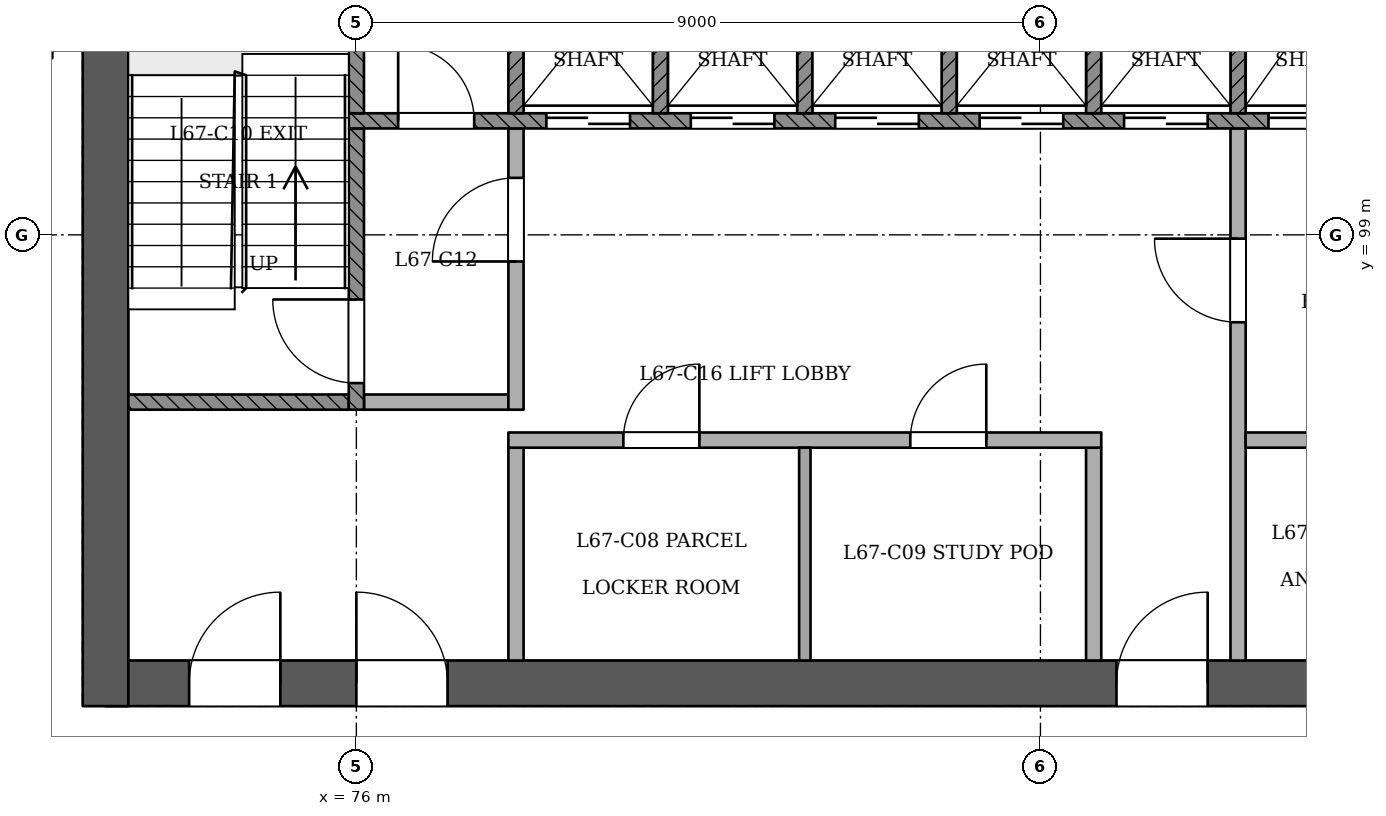
"""IFC4 building model, lengths in metres.
Left out: names, types, materials, properties, quantities, classifications, styles, units other than length and angle.
Written with IfcOpenShell. Run it as: python <this file> out.ifc"""

import sys

from ifc_helpers import new_model, si_unit, direction, frame, frame_2d, origin, place, context, subcontext, project, spatial, rectangle, extrude, element, fill, save


model = new_model("IFC4")
c1 = context("Model", 3, precision=1e-05, world=origin(), true_north=direction((0.0, 1.0)))
c2 = subcontext(c1, "Body", "Model", "MODEL_VIEW")
j1 = project(units=[si_unit("LENGTHUNIT", "METRE"), si_unit("PLANEANGLEUNIT", "RADIAN")], contexts=[c1])
p1 = place(None, origin())
s1 = spatial("IfcSite", under=j1, at=p1, CompositionType="ELEMENT")
p2 = place(p1, origin())
s2 = spatial("IfcBuilding", under=s1, at=p2, CompositionType="ELEMENT")
p3 = place(p2, frame((0.0, 0.0, 260.8)))
s3 = spatial("IfcBuildingStorey", under=s2, at=p3, CompositionType="ELEMENT", Elevation=260.8)
p4 = place(p3, frame((72.7, 93.1, 0.0), z_axis=(0.0, 0.0, 1.0), x_axis=(1.0, 0.0, 0.0)))
e1 = element("IfcWall", 1, at=p4, inside=s3, PredefinedType="SHEAR", context=c2, shape_type="SweptSolid", body=[
    extrude(rectangle(XDim=24.9, YDim=0.6, at=frame_2d((12.45, 0.0))), origin(), (0.0, 0.0, 1.0), 3.6),
])
p5 = place(p4, frame((1.1, 0.0, 0.0)))
e2 = element("IfcOpeningElement", 2, at=p5, cuts=e1, PredefinedType="OPENING", context=c2, shape_type="SweptSolid", body=[
    extrude(rectangle(XDim=1.2, YDim=2.1, at=frame_2d((0.6, 1.05))), frame((0.0, 0.311, 0.0), z_axis=(0.0, -1.0, 0.0), x_axis=(1.0, 0.0, 0.0)), (0.0, 0.0, 1.0), 0.621),
])
p6 = place(p4, frame((3.3, 0.0, 0.0)))
e3 = element("IfcOpeningElement", 3, at=p6, cuts=e1, PredefinedType="OPENING", context=c2, shape_type="SweptSolid", body=[
    extrude(rectangle(XDim=1.2, YDim=2.1, at=frame_2d((0.6, 1.05))), frame((0.0, 0.311, 0.0), z_axis=(0.0, -1.0, 0.0), x_axis=(1.0, 0.0, 0.0)), (0.0, 0.0, 1.0), 0.621),
])
p7 = place(p4, frame((13.3, 0.0, 0.0)))
e4 = element("IfcOpeningElement", 4, at=p7, cuts=e1, PredefinedType="OPENING", context=c2, shape_type="SweptSolid", body=[
    extrude(rectangle(XDim=1.2, YDim=2.1, at=frame_2d((0.6, 1.05))), frame((0.0, 0.311, 0.0), z_axis=(0.0, -1.0, 0.0), x_axis=(1.0, 0.0, 0.0)), (0.0, 0.0, 1.0), 0.621),
])
p8 = place(p4, frame((15.962, 0.0, 0.0)))
e5 = element("IfcOpeningElement", 5, at=p8, cuts=e1, PredefinedType="OPENING", context=c2, shape_type="SweptSolid", body=[
    extrude(rectangle(XDim=1.0, YDim=2.1, at=frame_2d((0.5, 1.05))), frame((0.0, 0.311, 0.0), z_axis=(0.0, -1.0, 0.0), x_axis=(1.0, 0.0, 0.0)), (0.0, 0.0, 1.0), 0.621),
])
p9 = place(p4, frame((18.75, 0.0, 0.0)))
e6 = element("IfcOpeningElement", 6, at=p9, cuts=e1, PredefinedType="OPENING", context=c2, shape_type="SweptSolid", body=[
    extrude(rectangle(XDim=1.0, YDim=2.1, at=frame_2d((0.5, 1.05))), frame((0.0, 0.311, 0.0), z_axis=(0.0, -1.0, 0.0), x_axis=(1.0, 0.0, 0.0)), (0.0, 0.0, 1.0), 0.621),
])
p10 = place(p4, frame((21.938, 0.0, 0.0)))
e7 = element("IfcOpeningElement", 7, at=p10, cuts=e1, PredefinedType="OPENING", context=c2, shape_type="SweptSolid", body=[
    extrude(rectangle(XDim=1.0, YDim=2.1, at=frame_2d((0.5, 1.05))), frame((0.0, 0.311, 0.0), z_axis=(0.0, -1.0, 0.0), x_axis=(1.0, 0.0, 0.0)), (0.0, 0.0, 1.0), 0.621),
])
p11 = place(p3, frame((72.7, 103.7, 0.0), z_axis=(0.0, 0.0, 1.0), x_axis=(0.0, -1.0, 0.0)))
e8 = element("IfcWall", 8, at=p11, inside=s3, PredefinedType="SHEAR", context=c2, shape_type="SweptSolid", body=[
    extrude(rectangle(XDim=10.9, YDim=0.6, at=frame_2d((5.45, 0.0))), origin(), (0.0, 0.0, 1.0), 3.6),
])
p12 = place(p3, frame((72.0, 101.4, 0.0), z_axis=(0.0, 0.0, 1.0), x_axis=(-1.0, 0.0, 0.0)))
e9 = element("IfcWall", 9, at=p12, inside=s3, PredefinedType="PARTITIONING", context=c2, shape_type="SweptSolid", body=[
    extrude(rectangle(XDim=1.8, YDim=0.15, at=frame_2d((0.9, 0.0))), origin(), (0.0, 0.0, 1.0), 3.2),
])
p13 = place(p12, frame((0.55, 0.0, 0.0)))
e10 = element("IfcOpeningElement", 10, at=p13, cuts=e9, PredefinedType="OPENING", context=c2, shape_type="SweptSolid", body=[
    extrude(rectangle(XDim=1.0, YDim=2.1, at=frame_2d((0.5, 1.05))), frame((0.0, 0.085, 0.0), z_axis=(0.0, -1.0, 0.0), x_axis=(1.0, 0.0, 0.0)), (0.0, 0.0, 1.0), 0.171),
])
p14 = place(p3, frame((78.1, 93.4, 0.0), z_axis=(0.0, 0.0, 1.0), x_axis=(0.0, 1.0, 0.0)))
e11 = element("IfcWall", 11, at=p14, inside=s3, PredefinedType="PARTITIONING", context=c2, shape_type="SweptSolid", body=[
    extrude(rectangle(XDim=2.8, YDim=0.2, at=frame_2d((1.4, 0.0))), origin(), (0.0, 0.0, 1.0), 3.2),
])
p15 = place(p3, frame((81.9, 93.4, 0.0), z_axis=(0.0, 0.0, 1.0), x_axis=(0.0, 1.0, 0.0)))
e12 = element("IfcWall", 12, at=p15, inside=s3, PredefinedType="PARTITIONING", context=c2, shape_type="SweptSolid", body=[
    extrude(rectangle(XDim=2.8, YDim=0.15, at=frame_2d((1.4, 0.0))), origin(), (0.0, 0.0, 1.0), 3.2),
])
p16 = place(p3, frame((85.7, 93.4, 0.0), z_axis=(0.0, 0.0, 1.0), x_axis=(0.0, 1.0, 0.0)))
e13 = element("IfcWall", 13, at=p16, inside=s3, PredefinedType="PARTITIONING", context=c2, shape_type="SweptSolid", body=[
    extrude(rectangle(XDim=2.8, YDim=0.2, at=frame_2d((1.4, 0.0))), origin(), (0.0, 0.0, 1.0), 3.2),
])
p17 = place(p3, frame((87.6, 93.4, 0.0), z_axis=(0.0, 0.0, 1.0), x_axis=(0.0, 1.0, 0.0)))
e14 = element("IfcWall", 14, at=p17, inside=s3, PredefinedType="PARTITIONING", context=c2, shape_type="SweptSolid", body=[
    extrude(rectangle(XDim=7.0, YDim=0.2, at=frame_2d((3.5, 0.0))), origin(), (0.0, 0.0, 1.0), 3.2),
])
p18 = place(p17, frame((4.45, 0.0, 0.0)))
e15 = element("IfcOpeningElement", 15, at=p18, cuts=e14, PredefinedType="OPENING", context=c2, shape_type="SweptSolid", body=[
    extrude(rectangle(XDim=1.1, YDim=2.1, at=frame_2d((0.55, 1.05))), frame((0.0, 0.11, 0.0), z_axis=(0.0, -1.0, 0.0), x_axis=(1.0, 0.0, 0.0)), (0.0, 0.0, 1.0), 0.221),
])
p19 = place(p3, frame((78.0, 96.3, 0.0), z_axis=(0.0, 0.0, 1.0), x_axis=(1.0, 0.0, 0.0)))
e16 = element("IfcWall", 16, at=p19, inside=s3, PredefinedType="PARTITIONING", context=c2, shape_type="SweptSolid", body=[
    extrude(rectangle(XDim=7.8, YDim=0.2, at=frame_2d((3.9, 0.0))), origin(), (0.0, 0.0, 1.0), 3.2),
])
p20 = place(p19, frame((1.512, 0.0, 0.0)))
e17 = element("IfcOpeningElement", 17, at=p20, cuts=e16, PredefinedType="OPENING", context=c2, shape_type="SweptSolid", body=[
    extrude(rectangle(XDim=1.0, YDim=2.1, at=frame_2d((0.5, 1.05))), frame((0.0, 0.11, 0.0), z_axis=(0.0, -1.0, 0.0), x_axis=(1.0, 0.0, 0.0)), (0.0, 0.0, 1.0), 0.221),
])
p21 = place(p19, frame((5.288, 0.0, 0.0)))
e18 = element("IfcOpeningElement", 18, at=p21, cuts=e16, PredefinedType="OPENING", context=c2, shape_type="SweptSolid", body=[
    extrude(rectangle(XDim=1.0, YDim=2.1, at=frame_2d((0.5, 1.05))), frame((0.0, 0.11, 0.0), z_axis=(0.0, -1.0, 0.0), x_axis=(1.0, 0.0, 0.0)), (0.0, 0.0, 1.0), 0.221),
])
p22 = place(p3, frame((87.7, 96.3, 0.0), z_axis=(0.0, 0.0, 1.0), x_axis=(1.0, 0.0, 0.0)))
e19 = element("IfcWall", 19, at=p22, inside=s3, PredefinedType="PARTITIONING", context=c2, shape_type="SweptSolid", body=[
    extrude(rectangle(XDim=3.6, YDim=0.2, at=frame_2d((1.8, 0.0))), origin(), (0.0, 0.0, 1.0), 3.2),
])
p23 = place(p3, frame((73.0, 96.8, 0.0), z_axis=(0.0, 0.0, 1.0), x_axis=(1.0, 0.0, 0.0)))
e20 = element("IfcWall", 20, at=p23, inside=s3, PredefinedType="SOLIDWALL", context=c2, shape_type="SweptSolid", body=[
    extrude(rectangle(XDim=2.9, YDim=0.2, at=frame_2d((1.45, 0.0))), origin(), (0.0, 0.0, 1.0), 3.2),
])
p24 = place(p3, frame((76.0, 96.7, 0.0), z_axis=(0.0, 0.0, 1.0), x_axis=(0.0, 1.0, 0.0)))
e21 = element("IfcWall", 21, at=p24, inside=s3, PredefinedType="SOLIDWALL", context=c2, shape_type="SweptSolid", body=[
    extrude(rectangle(XDim=3.7, YDim=0.2, at=frame_2d((1.85, 0.0))), origin(), (0.0, 0.0, 1.0), 3.2),
])
p25 = place(p24, frame((0.35, 0.0, 0.0)))
e22 = element("IfcOpeningElement", 22, at=p25, cuts=e21, PredefinedType="OPENING", context=c2, shape_type="SweptSolid", body=[
    extrude(rectangle(XDim=1.1, YDim=2.1, at=frame_2d((0.55, 1.05))), frame((0.0, 0.11, 0.0), z_axis=(0.0, -1.0, 0.0), x_axis=(1.0, 0.0, 0.0)), (0.0, 0.0, 1.0), 0.221),
])
p26 = place(p3, frame((76.1, 96.8, 0.0), z_axis=(0.0, 0.0, 1.0), x_axis=(1.0, 0.0, 0.0)))
e23 = element("IfcWall", 23, at=p26, inside=s3, PredefinedType="PARTITIONING", context=c2, shape_type="SweptSolid", body=[
    extrude(rectangle(XDim=1.9, YDim=0.2, at=frame_2d((0.95, 0.0))), origin(), (0.0, 0.0, 1.0), 3.2),
])
p27 = place(p3, frame((78.1, 96.7, 0.0), z_axis=(0.0, 0.0, 1.0), x_axis=(0.0, 1.0, 0.0)))
e24 = element("IfcWall", 24, at=p27, inside=s3, PredefinedType="PARTITIONING", context=c2, shape_type="SweptSolid", body=[
    extrude(rectangle(XDim=3.7, YDim=0.2, at=frame_2d((1.85, 0.0))), origin(), (0.0, 0.0, 1.0), 3.2),
])
p28 = place(p27, frame((1.95, 0.0, 0.0)))
e25 = element("IfcOpeningElement", 25, at=p28, cuts=e24, PredefinedType="OPENING", context=c2, shape_type="SweptSolid", body=[
    extrude(rectangle(XDim=1.1, YDim=2.1, at=frame_2d((0.55, 1.05))), frame((0.0, 0.11, 0.0), z_axis=(0.0, -1.0, 0.0), x_axis=(1.0, 0.0, 0.0)), (0.0, 0.0, 1.0), 0.221),
])
p29 = place(p3, frame((75.9, 100.5, 0.0), z_axis=(0.0, 0.0, 1.0), x_axis=(1.0, 0.0, 0.0)))
e26 = element("IfcWall", 26, at=p29, inside=s3, PredefinedType="SOLIDWALL", context=c2, shape_type="SweptSolid", body=[
    extrude(rectangle(XDim=18.2, YDim=0.2, at=frame_2d((9.1, 0.0))), origin(), (0.0, 0.0, 1.0), 3.2),
])
p30 = place(p29, frame((2.6, 0.0, 0.0)))
e27 = element("IfcOpeningElement", 27, at=p30, cuts=e26, PredefinedType="OPENING", context=c2, shape_type="SweptSolid", body=[
    extrude(rectangle(XDim=1.1, YDim=2.1, at=frame_2d((0.55, 1.05))), frame((0.0, 0.11, 0.0), z_axis=(0.0, -1.0, 0.0), x_axis=(1.0, 0.0, 0.0)), (0.0, 0.0, 1.0), 0.221),
])
p31 = place(p29, frame((4.5, 0.0, 0.0)))
e28 = element("IfcOpeningElement", 28, at=p31, cuts=e26, PredefinedType="OPENING", context=c2, shape_type="SweptSolid", body=[
    extrude(rectangle(XDim=1.1, YDim=2.1, at=frame_2d((0.55, 1.05))), frame((0.0, 0.11, 0.0), z_axis=(0.0, -1.0, 0.0), x_axis=(1.0, 0.0, 0.0)), (0.0, 0.0, 1.0), 0.221),
])
p32 = place(p29, frame((6.4, 0.0, 0.0)))
e29 = element("IfcOpeningElement", 29, at=p32, cuts=e26, PredefinedType="OPENING", context=c2, shape_type="SweptSolid", body=[
    extrude(rectangle(XDim=1.1, YDim=2.1, at=frame_2d((0.55, 1.05))), frame((0.0, 0.11, 0.0), z_axis=(0.0, -1.0, 0.0), x_axis=(1.0, 0.0, 0.0)), (0.0, 0.0, 1.0), 0.221),
])
p33 = place(p29, frame((8.3, 0.0, 0.0)))
e30 = element("IfcOpeningElement", 30, at=p33, cuts=e26, PredefinedType="OPENING", context=c2, shape_type="SweptSolid", body=[
    extrude(rectangle(XDim=1.1, YDim=2.1, at=frame_2d((0.55, 1.05))), frame((0.0, 0.11, 0.0), z_axis=(0.0, -1.0, 0.0), x_axis=(1.0, 0.0, 0.0)), (0.0, 0.0, 1.0), 0.221),
])
p34 = place(p29, frame((10.2, 0.0, 0.0)))
e31 = element("IfcOpeningElement", 31, at=p34, cuts=e26, PredefinedType="OPENING", context=c2, shape_type="SweptSolid", body=[
    extrude(rectangle(XDim=1.1, YDim=2.1, at=frame_2d((0.55, 1.05))), frame((0.0, 0.11, 0.0), z_axis=(0.0, -1.0, 0.0), x_axis=(1.0, 0.0, 0.0)), (0.0, 0.0, 1.0), 0.221),
])
p35 = place(p29, frame((12.1, 0.0, 0.0)))
e32 = element("IfcOpeningElement", 32, at=p35, cuts=e26, PredefinedType="OPENING", context=c2, shape_type="SweptSolid", body=[
    extrude(rectangle(XDim=1.1, YDim=2.1, at=frame_2d((0.55, 1.05))), frame((0.0, 0.11, 0.0), z_axis=(0.0, -1.0, 0.0), x_axis=(1.0, 0.0, 0.0)), (0.0, 0.0, 1.0), 0.221),
])
p36 = place(p29, frame((14.0, 0.0, 0.0)))
e33 = element("IfcOpeningElement", 33, at=p36, cuts=e26, PredefinedType="OPENING", context=c2, shape_type="SweptSolid", body=[
    extrude(rectangle(XDim=1.1, YDim=2.1, at=frame_2d((0.55, 1.05))), frame((0.0, 0.11, 0.0), z_axis=(0.0, -1.0, 0.0), x_axis=(1.0, 0.0, 0.0)), (0.0, 0.0, 1.0), 0.221),
])
p37 = place(p29, frame((0.65, 0.0, 0.0)))
e34 = element("IfcOpeningElement", 34, at=p37, cuts=e26, PredefinedType="OPENING", context=c2, shape_type="SweptSolid", body=[
    extrude(rectangle(XDim=1.0, YDim=2.1, at=frame_2d((0.5, 1.05))), frame((0.0, 0.11, 0.0), z_axis=(0.0, -1.0, 0.0), x_axis=(1.0, 0.0, 0.0)), (0.0, 0.0, 1.0), 0.221),
])
p38 = place(p29, frame((16.3, 0.0, 0.0)))
e35 = element("IfcOpeningElement", 35, at=p38, cuts=e26, PredefinedType="OPENING", context=c2, shape_type="SweptSolid", body=[
    extrude(rectangle(XDim=1.0, YDim=2.1, at=frame_2d((0.5, 1.05))), frame((0.0, 0.11, 0.0), z_axis=(0.0, -1.0, 0.0), x_axis=(1.0, 0.0, 0.0)), (0.0, 0.0, 1.0), 0.221),
])
for number, where, z_axis, x_axis in (
    (36, (76.0, 100.6, 0.0), (0.0, 0.0, 1.0), (0.0, 1.0, 0.0)),
    (37, (78.1, 100.6, 0.0), (0.0, 0.0, 1.0), (0.0, 1.0, 0.0)),
    (38, (80.0, 100.6, 0.0), (0.0, 0.0, 1.0), (0.0, 1.0, 0.0)),
    (39, (81.9, 100.6, 0.0), (0.0, 0.0, 1.0), (0.0, 1.0, 0.0)),
    (40, (83.8, 100.6, 0.0), (0.0, 0.0, 1.0), (0.0, 1.0, 0.0)),
    (41, (85.7, 100.6, 0.0), (0.0, 0.0, 1.0), (0.0, 1.0, 0.0)),
    (42, (87.6, 100.6, 0.0), (0.0, 0.0, 1.0), (0.0, 1.0, 0.0)),
):
    element("IfcWall", number, at=place(p3, frame(where, z_axis=z_axis, x_axis=x_axis)), inside=s3, PredefinedType="SOLIDWALL", context=c2, shape_type="SweptSolid", body=[
        extrude(rectangle(XDim=2.8, YDim=0.2, at=frame_2d((1.4, 0.0))), origin(), (0.0, 0.0, 1.0), 3.2),
    ])
p39 = place(p30, origin())
e43 = element("IfcDoor", 43, at=p39, inside=s3, OperationType="SLIDING_TO_RIGHT", PredefinedType="NOTDEFINED", context=c2, shape_type="SweptSolid", body=[
    extrude(rectangle(XDim=1.1, YDim=2.1, at=frame_2d((0.55, 1.05))), frame((0.0, 0.025, 0.0), z_axis=(0.0, -1.0, 0.0), x_axis=(1.0, 0.0, 0.0)), (0.0, 0.0, 1.0), 0.05),
])
fill(e27, e43)
p40 = place(p31, origin())
e44 = element("IfcDoor", 44, at=p40, inside=s3, OperationType="SLIDING_TO_LEFT", PredefinedType="NOTDEFINED", context=c2, shape_type="SweptSolid", body=[
    extrude(rectangle(XDim=1.1, YDim=2.1, at=frame_2d((0.55, 1.05))), frame((0.0, 0.025, 0.0), z_axis=(0.0, -1.0, 0.0), x_axis=(1.0, 0.0, 0.0)), (0.0, 0.0, 1.0), 0.05),
])
fill(e28, e44)
p41 = place(p32, origin())
e45 = element("IfcDoor", 45, at=p41, inside=s3, OperationType="SLIDING_TO_RIGHT", PredefinedType="NOTDEFINED", context=c2, shape_type="SweptSolid", body=[
    extrude(rectangle(XDim=1.1, YDim=2.1, at=frame_2d((0.55, 1.05))), frame((0.0, 0.025, 0.0), z_axis=(0.0, -1.0, 0.0), x_axis=(1.0, 0.0, 0.0)), (0.0, 0.0, 1.0), 0.05),
])
fill(e29, e45)
p42 = place(p33, origin())
e46 = element("IfcDoor", 46, at=p42, inside=s3, OperationType="SLIDING_TO_LEFT", PredefinedType="NOTDEFINED", context=c2, shape_type="SweptSolid", body=[
    extrude(rectangle(XDim=1.1, YDim=2.1, at=frame_2d((0.55, 1.05))), frame((0.0, 0.025, 0.0), z_axis=(0.0, -1.0, 0.0), x_axis=(1.0, 0.0, 0.0)), (0.0, 0.0, 1.0), 0.05),
])
fill(e30, e46)
p43 = place(p34, origin())
e47 = element("IfcDoor", 47, at=p43, inside=s3, OperationType="SLIDING_TO_RIGHT", PredefinedType="NOTDEFINED", context=c2, shape_type="SweptSolid", body=[
    extrude(rectangle(XDim=1.1, YDim=2.1, at=frame_2d((0.55, 1.05))), frame((0.0, 0.025, 0.0), z_axis=(0.0, -1.0, 0.0), x_axis=(1.0, 0.0, 0.0)), (0.0, 0.0, 1.0), 0.05),
])
fill(e31, e47)
p44 = place(p35, origin())
e48 = element("IfcDoor", 48, at=p44, inside=s3, OperationType="SLIDING_TO_RIGHT", PredefinedType="NOTDEFINED", context=c2, shape_type="SweptSolid", body=[
    extrude(rectangle(XDim=1.1, YDim=2.1, at=frame_2d((0.55, 1.05))), frame((0.0, 0.025, 0.0), z_axis=(0.0, -1.0, 0.0), x_axis=(1.0, 0.0, 0.0)), (0.0, 0.0, 1.0), 0.05),
])
fill(e32, e48)
p45 = place(p25, origin())
e49 = element("IfcDoor", 49, at=p45, inside=s3, OperationType="SINGLE_SWING_RIGHT", PredefinedType="NOTDEFINED", context=c2, shape_type="SweptSolid", body=[
    extrude(rectangle(XDim=1.1, YDim=2.1, at=frame_2d((0.55, 1.05))), frame((0.0, 0.025, 0.0), z_axis=(0.0, -1.0, 0.0), x_axis=(1.0, 0.0, 0.0)), (0.0, 0.0, 1.0), 0.05),
])
fill(e22, e49)
p46 = place(p28, origin())
e50 = element("IfcDoor", 50, at=p46, inside=s3, OperationType="SINGLE_SWING_LEFT", PredefinedType="NOTDEFINED", context=c2, shape_type="SweptSolid", body=[
    extrude(rectangle(XDim=1.1, YDim=2.1, at=frame_2d((0.55, 1.05))), frame((0.0, 0.025, 0.0), z_axis=(0.0, -1.0, 0.0), x_axis=(1.0, 0.0, 0.0)), (0.0, 0.0, 1.0), 0.05),
])
fill(e25, e50)
p47 = place(p18, origin())
e51 = element("IfcDoor", 51, at=p47, inside=s3, OperationType="SINGLE_SWING_RIGHT", PredefinedType="NOTDEFINED", context=c2, shape_type="SweptSolid", body=[
    extrude(rectangle(XDim=1.1, YDim=2.1, at=frame_2d((0.55, 1.05))), frame((0.0, 0.025, 0.0), z_axis=(0.0, -1.0, 0.0), x_axis=(1.0, 0.0, 0.0)), (0.0, 0.0, 1.0), 0.05),
])
fill(e15, e51)
p48 = place(p5, origin())
e52 = element("IfcDoor", 52, at=p48, inside=s3, OperationType="SINGLE_SWING_RIGHT", PredefinedType="NOTDEFINED", context=c2, shape_type="SweptSolid", body=[
    extrude(rectangle(XDim=1.2, YDim=2.1, at=frame_2d((0.6, 1.05))), frame((0.0, 0.025, 0.0), z_axis=(0.0, -1.0, 0.0), x_axis=(1.0, 0.0, 0.0)), (0.0, 0.0, 1.0), 0.05),
])
fill(e2, e52)
p49 = place(p6, origin())
e53 = element("IfcDoor", 53, at=p49, inside=s3, OperationType="SINGLE_SWING_LEFT", PredefinedType="NOTDEFINED", context=c2, shape_type="SweptSolid", body=[
    extrude(rectangle(XDim=1.2, YDim=2.1, at=frame_2d((0.6, 1.05))), frame((0.0, 0.025, 0.0), z_axis=(0.0, -1.0, 0.0), x_axis=(1.0, 0.0, 0.0)), (0.0, 0.0, 1.0), 0.05),
])
fill(e3, e53)
p50 = place(p7, origin())
e54 = element("IfcDoor", 54, at=p50, inside=s3, OperationType="SINGLE_SWING_RIGHT", PredefinedType="NOTDEFINED", context=c2, shape_type="SweptSolid", body=[
    extrude(rectangle(XDim=1.2, YDim=2.1, at=frame_2d((0.6, 1.05))), frame((0.0, 0.025, 0.0), z_axis=(0.0, -1.0, 0.0), x_axis=(1.0, 0.0, 0.0)), (0.0, 0.0, 1.0), 0.05),
])
fill(e4, e54)
p51 = place(p37, origin())
e55 = element("IfcDoor", 55, at=p51, inside=s3, OperationType="SINGLE_SWING_LEFT", PredefinedType="NOTDEFINED", context=c2, shape_type="SweptSolid", body=[
    extrude(rectangle(XDim=1.0, YDim=2.1, at=frame_2d((0.5, 1.05))), frame((0.0, 0.025, 0.0), z_axis=(0.0, -1.0, 0.0), x_axis=(1.0, 0.0, 0.0)), (0.0, 0.0, 1.0), 0.05),
])
fill(e34, e55)
p52 = place(p20, origin())
e56 = element("IfcDoor", 56, at=p52, inside=s3, OperationType="SINGLE_SWING_RIGHT", PredefinedType="NOTDEFINED", context=c2, shape_type="SweptSolid", body=[
    extrude(rectangle(XDim=1.0, YDim=2.1, at=frame_2d((0.5, 1.05))), frame((0.0, 0.025, 0.0), z_axis=(0.0, -1.0, 0.0), x_axis=(1.0, 0.0, 0.0)), (0.0, 0.0, 1.0), 0.05),
])
fill(e17, e56)
p53 = place(p21, origin())
e57 = element("IfcDoor", 57, at=p53, inside=s3, OperationType="SINGLE_SWING_RIGHT", PredefinedType="NOTDEFINED", context=c2, shape_type="SweptSolid", body=[
    extrude(rectangle(XDim=1.0, YDim=2.1, at=frame_2d((0.5, 1.05))), frame((0.0, 0.025, 0.0), z_axis=(0.0, -1.0, 0.0), x_axis=(1.0, 0.0, 0.0)), (0.0, 0.0, 1.0), 0.05),
])
fill(e18, e57)
save(model, sys.argv[1])
